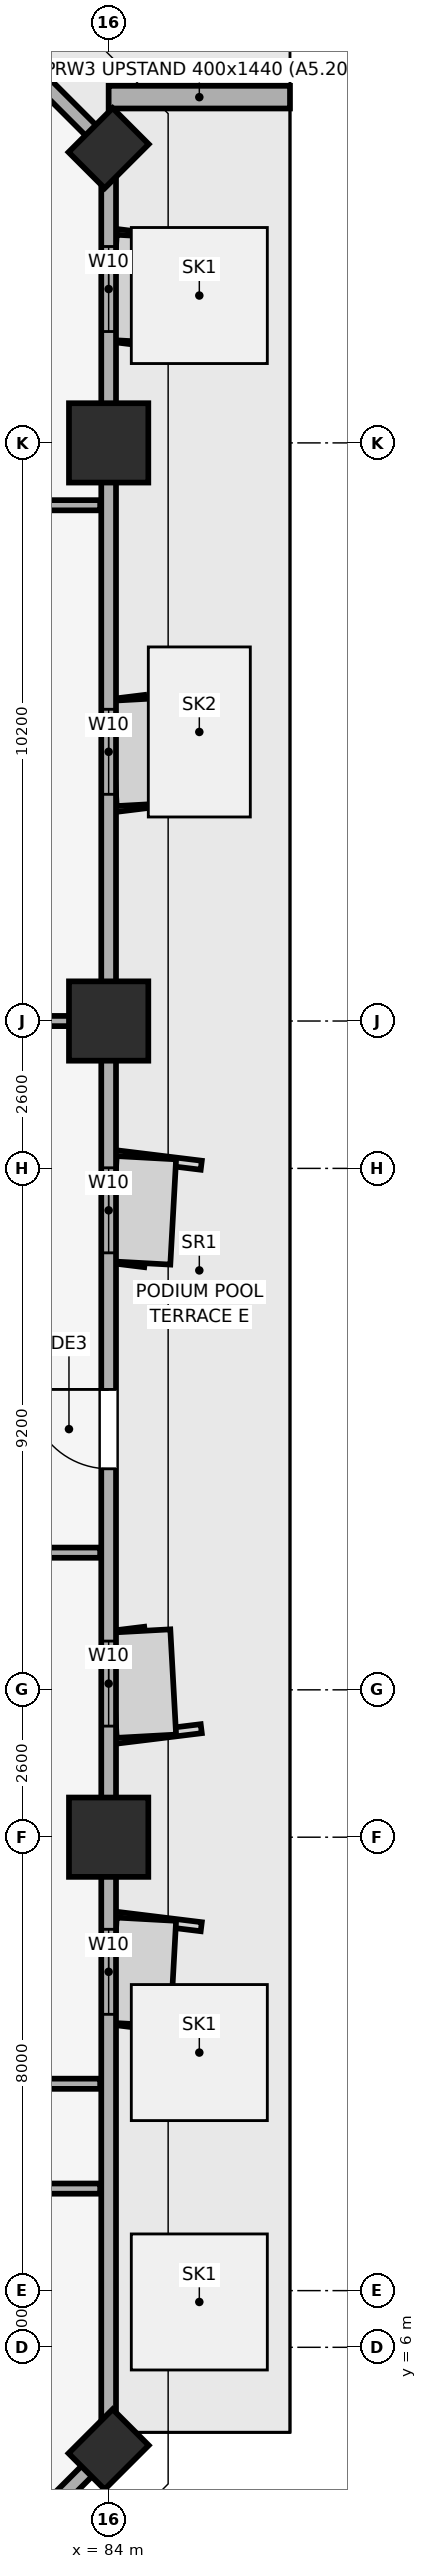
"""IFC4 building model, lengths in metres.
Left out: names, types, materials, properties, quantities, classifications, styles, units other than length and angle.
Written with IfcOpenShell. Run it as: python <this file> out.ifc"""

import sys

from ifc_helpers import new_model, si_unit, direction, frame, frame_2d, origin, origin_2d, place, context, subcontext, project, spatial, rectangle, extrude, element, fill, save


model = new_model("IFC4")
c1 = context("Model", 3, precision=1e-05, world=origin(), true_north=direction((0.0, 1.0)))
c2 = subcontext(c1, "Body", "Model", "MODEL_VIEW")
j1 = project(units=[si_unit("LENGTHUNIT", "METRE"), si_unit("PLANEANGLEUNIT", "RADIAN")], contexts=[c1])
p1 = place(None, origin())
s1 = spatial("IfcSite", under=j1, at=p1, CompositionType="ELEMENT")
p2 = place(p1, origin())
s2 = spatial("IfcBuilding", under=s1, at=p2, CompositionType="ELEMENT")
p3 = place(p2, frame((0.0, 0.0, 31.4)))
s3 = spatial("IfcBuildingStorey", under=s2, at=p3, CompositionType="ELEMENT", Elevation=31.4)
for number, where, z_axis, x_axis in (
    (1, (84.0, 15.0, 0.0), (0.0, 0.0, 1.0), (1.0, 0.0, 0.0)),
    (2, (84.0, 29.4, 0.0), (0.0, 0.0, 1.0), (1.0, 0.0, 0.0)),
    (3, (84.0, 39.6, 0.0), (0.0, 0.0, 1.0), (1.0, 0.0, 0.0)),
):
    element("IfcColumn", number, at=place(p3, frame(where, z_axis=z_axis, x_axis=x_axis)), inside=s3, PredefinedType="COLUMN", context=c2, shape_type="SweptSolid", body=[
        extrude(rectangle(XDim=1.4, YDim=1.4, at=origin_2d()), origin(), (0.0, 0.0, 1.0), 3.51),
    ])
for number, where, z_axis, x_axis in (
    (4, (84.0, 4.2, 0.0), (0.0, 0.0, 1.0), (0.707, 0.707, 0.0)),
    (5, (84.0, 44.8, 0.0), (0.0, 0.0, 1.0), (0.707, 0.707, 0.0)),
):
    element("IfcColumn", number, at=place(p3, frame(where, z_axis=z_axis, x_axis=x_axis)), inside=s3, PredefinedType="PILASTER", context=c2, shape_type="SweptSolid", body=[
        extrude(rectangle(XDim=1.1, YDim=0.9, at=origin_2d()), origin(), (0.0, 0.0, 1.0), 3.51),
    ])
p4 = place(p3, frame((79.8, 0.0, 0.0), z_axis=(0.0, 0.0, 1.0), x_axis=(0.707106781187, 0.707106781187, 0.0)))
e6 = element("IfcWall", 6, at=p4, inside=s3, PredefinedType="SOLIDWALL", context=c2, shape_type="SweptSolid", body=[
    extrude(rectangle(XDim=5.94, YDim=0.26, at=frame_2d((2.97, 0.0))), origin(), (0.0, 0.0, 1.0), 2.56),
])
p5 = place(p3, frame((84.0, 4.2, 0.0), z_axis=(0.0, 0.0, 1.0), x_axis=(0.0, 1.0, 0.0)))
e7 = element("IfcWall", 7, at=p5, inside=s3, PredefinedType="SOLIDWALL", context=c2, shape_type="SweptSolid", body=[
    extrude(rectangle(XDim=40.6, YDim=0.26, at=frame_2d((20.3, 0.0))), origin(), (0.0, 0.0, 1.0), 2.56),
])
p6 = place(p5, frame((17.3, 0.0, 0.0)))
e8 = element("IfcOpeningElement", 8, at=p6, cuts=e7, PredefinedType="OPENING", context=c2, shape_type="SweptSolid", body=[
    extrude(rectangle(XDim=1.4, YDim=2.2, at=frame_2d((0.7, 1.1))), frame((0.0, 0.14, 0.0), z_axis=(0.0, -1.0, 0.0), x_axis=(1.0, 0.0, 0.0)), (0.0, 0.0, 1.0), 0.28),
])
p7 = place(p5, frame((7.675, 0.0, 0.85)))
e9 = element("IfcOpeningElement", 9, at=p7, cuts=e7, PredefinedType="OPENING", context=c2, shape_type="SweptSolid", body=[
    extrude(rectangle(XDim=1.5, YDim=1.4, at=frame_2d((0.75, 0.7))), frame((0.0, 0.14, 0.0), z_axis=(0.0, -1.0, 0.0), x_axis=(1.0, 0.0, 0.0)), (0.0, 0.0, 1.0), 0.28),
])
p8 = place(p5, frame((12.76, 0.0, 0.85)))
e10 = element("IfcOpeningElement", 10, at=p8, cuts=e7, PredefinedType="OPENING", context=c2, shape_type="SweptSolid", body=[
    extrude(rectangle(XDim=1.5, YDim=1.4, at=frame_2d((0.75, 0.7))), frame((0.0, 0.14, 0.0), z_axis=(0.0, -1.0, 0.0), x_axis=(1.0, 0.0, 0.0)), (0.0, 0.0, 1.0), 0.28),
])
p9 = place(p5, frame((21.11, 0.0, 0.85)))
e11 = element("IfcOpeningElement", 11, at=p9, cuts=e7, PredefinedType="OPENING", context=c2, shape_type="SweptSolid", body=[
    extrude(rectangle(XDim=1.5, YDim=1.4, at=frame_2d((0.75, 0.7))), frame((0.0, 0.14, 0.0), z_axis=(0.0, -1.0, 0.0), x_axis=(1.0, 0.0, 0.0)), (0.0, 0.0, 1.0), 0.28),
])
p10 = place(p5, frame((29.2, 0.0, 0.85)))
e12 = element("IfcOpeningElement", 12, at=p10, cuts=e7, PredefinedType="OPENING", context=c2, shape_type="SweptSolid", body=[
    extrude(rectangle(XDim=1.5, YDim=1.4, at=frame_2d((0.75, 0.7))), frame((0.0, 0.14, 0.0), z_axis=(0.0, -1.0, 0.0), x_axis=(1.0, 0.0, 0.0)), (0.0, 0.0, 1.0), 0.28),
])
p11 = place(p5, frame((37.365, 0.0, 0.85)))
e13 = element("IfcOpeningElement", 13, at=p11, cuts=e7, PredefinedType="OPENING", context=c2, shape_type="SweptSolid", body=[
    extrude(rectangle(XDim=1.5, YDim=1.4, at=frame_2d((0.75, 0.7))), frame((0.0, 0.14, 0.0), z_axis=(0.0, -1.0, 0.0), x_axis=(1.0, 0.0, 0.0)), (0.0, 0.0, 1.0), 0.28),
])
p12 = place(p3, frame((84.0, 44.8, 0.0), z_axis=(0.0, 0.0, 1.0), x_axis=(-0.707106781187, 0.707106781187, 0.0)))
e14 = element("IfcWall", 14, at=p12, inside=s3, PredefinedType="SOLIDWALL", context=c2, shape_type="SweptSolid", body=[
    extrude(rectangle(XDim=5.94, YDim=0.26, at=frame_2d((2.97, 0.0))), origin(), (0.0, 0.0, 1.0), 2.56),
])
p13 = place(p3, frame((84.0, 45.7, -0.24), z_axis=(0.0, 0.0, 1.0), x_axis=(1.0, 0.0, 0.0)))
e15 = element("IfcWall", 15, at=p13, inside=s3, PredefinedType="PARAPET", context=c2, shape_type="SweptSolid", body=[
    extrude(rectangle(XDim=3.2, YDim=0.4, at=frame_2d((1.6, 0.0))), origin(), (0.0, 0.0, 1.0), 1.44),
])
p14 = place(p3, frame((71.312, 8.8, 0.0), z_axis=(0.0, 0.0, 1.0), x_axis=(1.0, 0.0, 0.0)))
e16 = element("IfcWall", 16, at=p14, inside=s3, PredefinedType="PARTITIONING", context=c2, shape_type="SweptSolid", body=[
    extrude(rectangle(XDim=12.538, YDim=0.18, at=frame_2d((6.269, 0.0))), origin(), (0.0, 0.0, 1.0), 3.51),
])
p15 = place(p14, frame((5.853, 0.0, 0.0)))
e17 = element("IfcOpeningElement", 17, at=p15, cuts=e16, PredefinedType="OPENING", context=c2, shape_type="SweptSolid", body=[
    extrude(rectangle(XDim=1.0, YDim=2.15, at=frame_2d((0.5, 1.075))), frame((0.0, 0.1, 0.0), z_axis=(0.0, -1.0, 0.0), x_axis=(1.0, 0.0, 0.0)), (0.0, 0.0, 1.0), 0.2),
])
for number, where, z_axis, x_axis in (
    (18, (70.2, 10.65, 0.0), (0.0, 0.0, 1.0), (1.0, 0.0, 0.0)),
    (19, (70.2, 20.02, 0.0), (0.0, 0.0, 1.0), (1.0, 0.0, 0.0)),
):
    element("IfcWall", number, at=place(p3, frame(where, z_axis=z_axis, x_axis=x_axis)), inside=s3, PredefinedType="PARTITIONING", context=c2, shape_type="SweptSolid", body=[
        extrude(rectangle(XDim=13.65, YDim=0.18, at=frame_2d((6.825, 0.0))), origin(), (0.0, 0.0, 1.0), 3.51),
    ])
p16 = place(p3, frame((70.2, 29.4, 0.0), z_axis=(0.0, 0.0, 1.0), x_axis=(1.0, 0.0, 0.0)))
e20 = element("IfcWall", 20, at=p16, inside=s3, PredefinedType="PARTITIONING", context=c2, shape_type="SweptSolid", body=[
    extrude(rectangle(XDim=13.65, YDim=0.18, at=frame_2d((6.825, 0.0))), origin(), (0.0, 0.0, 1.0), 2.86),
])
p17 = place(p3, frame((70.2, 38.5, 0.0), z_axis=(0.0, 0.0, 1.0), x_axis=(1.0, 0.0, 0.0)))
e21 = element("IfcWall", 21, at=p17, inside=s3, PredefinedType="PARTITIONING", context=c2, shape_type="SweptSolid", body=[
    extrude(rectangle(XDim=13.65, YDim=0.18, at=frame_2d((6.825, 0.0))), origin(), (0.0, 0.0, 1.0), 3.51),
])
p18 = place(p3, frame((0.0, 0.0, -0.28)))
p19 = place(p18, frame((85.6, 34.5, 0.23)))
e22 = element("IfcWindow", 22, at=p19, inside=s3, PartitioningType="SINGLE_PANEL", PredefinedType="SKYLIGHT", context=c2, shape_type="SweptSolid", body=[
    extrude(rectangle(XDim=1.8, YDim=3.0, at=origin_2d()), origin(), (0.0, 0.0, 1.0), 0.05),
])
p20 = place(p18, frame((85.6, 6.8, 0.23)))
e23 = element("IfcWindow", 23, at=p20, inside=s3, PartitioningType="SINGLE_PANEL", PredefinedType="SKYLIGHT", context=c2, shape_type="SweptSolid", body=[
    extrude(rectangle(XDim=2.4, YDim=2.4, at=origin_2d()), origin(), (0.0, 0.0, 1.0), 0.05),
])
p21 = place(p18, frame((85.6, 11.2, 0.23)))
e24 = element("IfcWindow", 24, at=p21, inside=s3, PartitioningType="SINGLE_PANEL", PredefinedType="SKYLIGHT", context=c2, shape_type="SweptSolid", body=[
    extrude(rectangle(XDim=2.4, YDim=2.4, at=origin_2d()), origin(), (0.0, 0.0, 1.0), 0.05),
])
p22 = place(p18, frame((85.6, 42.2, 0.23)))
e25 = element("IfcWindow", 25, at=p22, inside=s3, PartitioningType="SINGLE_PANEL", PredefinedType="SKYLIGHT", context=c2, shape_type="SweptSolid", body=[
    extrude(rectangle(XDim=2.4, YDim=2.4, at=origin_2d()), origin(), (0.0, 0.0, 1.0), 0.05),
])
p23 = place(p6, origin())
e26 = element("IfcDoor", 26, at=p23, inside=s3, OperationType="SINGLE_SWING_RIGHT", PredefinedType="DOOR", context=c2, shape_type="SweptSolid", body=[
    extrude(rectangle(XDim=1.4, YDim=2.2, at=frame_2d((0.7, 1.1))), frame((0.0, 0.025, 0.0), z_axis=(0.0, -1.0, 0.0), x_axis=(1.0, 0.0, 0.0)), (0.0, 0.0, 1.0), 0.05),
])
fill(e8, e26)
p24 = place(p7, origin())
e27 = element("IfcWindow", 27, at=p24, inside=s3, PartitioningType="SINGLE_PANEL", PredefinedType="WINDOW", context=c2, shape_type="SweptSolid", body=[
    extrude(rectangle(XDim=1.5, YDim=1.4, at=frame_2d((0.75, 0.7))), frame((0.0, 0.03, 0.0), z_axis=(0.0, -1.0, 0.0), x_axis=(1.0, 0.0, 0.0)), (0.0, 0.0, 1.0), 0.06),
])
fill(e9, e27)
p25 = place(p8, origin())
e28 = element("IfcWindow", 28, at=p25, inside=s3, PartitioningType="SINGLE_PANEL", PredefinedType="WINDOW", context=c2, shape_type="SweptSolid", body=[
    extrude(rectangle(XDim=1.5, YDim=1.4, at=frame_2d((0.75, 0.7))), frame((0.0, 0.03, 0.0), z_axis=(0.0, -1.0, 0.0), x_axis=(1.0, 0.0, 0.0)), (0.0, 0.0, 1.0), 0.06),
])
fill(e10, e28)
p26 = place(p9, origin())
e29 = element("IfcWindow", 29, at=p26, inside=s3, PartitioningType="SINGLE_PANEL", PredefinedType="WINDOW", context=c2, shape_type="SweptSolid", body=[
    extrude(rectangle(XDim=1.5, YDim=1.4, at=frame_2d((0.75, 0.7))), frame((0.0, 0.03, 0.0), z_axis=(0.0, -1.0, 0.0), x_axis=(1.0, 0.0, 0.0)), (0.0, 0.0, 1.0), 0.06),
])
fill(e11, e29)
p27 = place(p10, origin())
e30 = element("IfcWindow", 30, at=p27, inside=s3, PartitioningType="SINGLE_PANEL", PredefinedType="WINDOW", context=c2, shape_type="SweptSolid", body=[
    extrude(rectangle(XDim=1.5, YDim=1.4, at=frame_2d((0.75, 0.7))), frame((0.0, 0.03, 0.0), z_axis=(0.0, -1.0, 0.0), x_axis=(1.0, 0.0, 0.0)), (0.0, 0.0, 1.0), 0.06),
])
fill(e12, e30)
p28 = place(p11, origin())
e31 = element("IfcWindow", 31, at=p28, inside=s3, PartitioningType="SINGLE_PANEL", PredefinedType="WINDOW", context=c2, shape_type="SweptSolid", body=[
    extrude(rectangle(XDim=1.5, YDim=1.4, at=frame_2d((0.75, 0.7))), frame((0.0, 0.03, 0.0), z_axis=(0.0, -1.0, 0.0), x_axis=(1.0, 0.0, 0.0)), (0.0, 0.0, 1.0), 0.06),
])
fill(e13, e31)
save(model, sys.argv[1])
